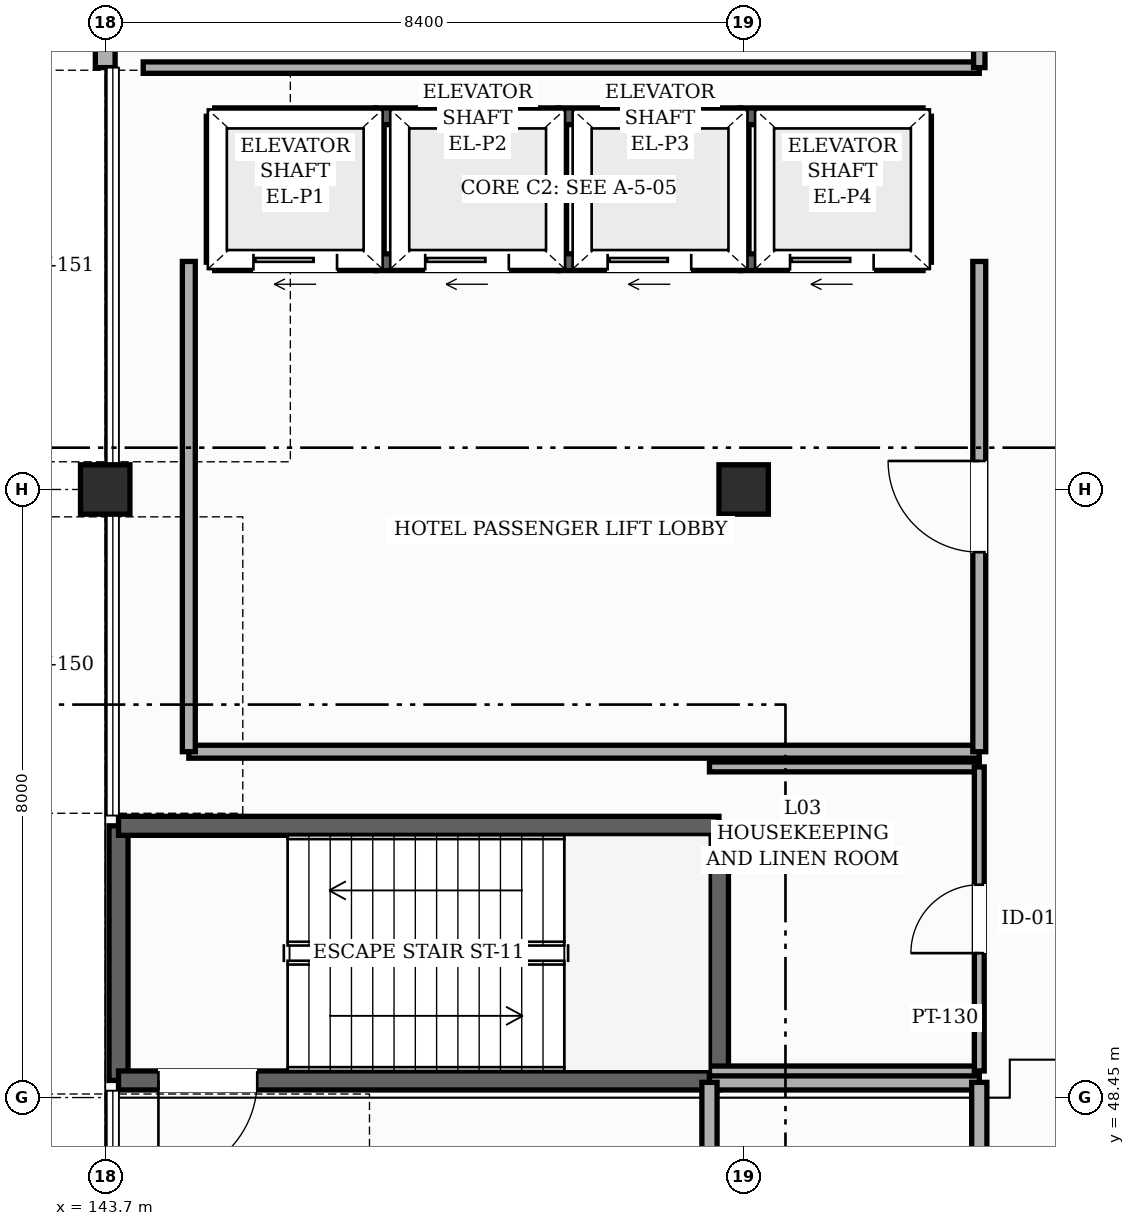
"""IFC4 building model, lengths in metres.
Left out: names, types, materials, properties, quantities, classifications, styles, units other than length and angle.
Written with IfcOpenShell. Run it as: python <this file> out.ifc"""

import sys

from ifc_helpers import new_model, si_unit, direction, frame, frame_2d, origin, origin_2d, place, context, subcontext, project, spatial, rectangle, hollow_rectangle, extrude, element, fill, save


model = new_model("IFC4")
c1 = context("Model", 3, precision=1e-05, world=origin(), true_north=direction((0.0, 1.0)))
c2 = subcontext(c1, "Body", "Model", "MODEL_VIEW")
j1 = project(units=[si_unit("LENGTHUNIT", "METRE"), si_unit("PLANEANGLEUNIT", "RADIAN")], contexts=[c1])
p1 = place(None, origin())
s1 = spatial("IfcSite", under=j1, at=p1, CompositionType="ELEMENT")
p2 = place(p1, origin())
s2 = spatial("IfcBuilding", under=s1, at=p2, CompositionType="ELEMENT")
p3 = place(p2, frame((0.0, 0.0, 15.0)))
s3 = spatial("IfcBuildingStorey", under=s2, at=p3, CompositionType="ELEMENT", Elevation=15.0)
for number, where, z_axis, x_axis in (
    (1, (143.7, 56.45, 0.0), (0.0, 0.0, 1.0), (1.0, 0.0, 0.0)),
    (2, (152.1, 56.45, 0.0), (0.0, 0.0, 1.0), (1.0, 0.0, 0.0)),
):
    element("IfcColumn", number, at=place(p3, frame(where, z_axis=z_axis, x_axis=x_axis)), inside=s3, PredefinedType="COLUMN", context=c2, shape_type="SweptSolid", body=[
        extrude(hollow_rectangle(XDim=0.65, YDim=0.65, WallThickness=0.025, InnerFilletRadius=0.025, OuterFilletRadius=0.05, at=origin_2d()), origin(), (0.0, 0.0, 1.0), 4.8),
    ])
p4 = place(p3, frame((143.7, 62.0, 0.0), z_axis=(0.0, 0.0, 1.0), x_axis=(0.0, 1.0, 0.0)))
e3 = element("IfcWall", 3, at=p4, inside=s3, PredefinedType="SOLIDWALL", context=c2, shape_type="SweptSolid", body=[
    extrude(rectangle(XDim=2.125, YDim=0.26, at=frame_2d((1.062, 0.0))), origin(), (0.0, 0.0, 1.0), 3.985),
])
p5 = place(p4, frame((0.49, 0.0, 0.85)))
e4 = element("IfcOpeningElement", 4, at=p5, cuts=e3, PredefinedType="OPENING", context=c2, shape_type="SweptSolid", body=[
    extrude(rectangle(XDim=1.15, YDim=1.65, at=frame_2d((0.575, 0.825))), frame((0.0, 0.14, 0.0), z_axis=(0.0, -1.0, 0.0), x_axis=(1.0, 0.0, 0.0)), (0.0, 0.0, 1.0), 0.28),
])
for number, where, z_axis, x_axis in (
    (5, (143.875, 48.675, 0.0), (0.0, 0.0, 1.0), (0.0, 1.0, 0.0)),
    (6, (151.775, 52.025, 0.0), (0.0, 0.0, 1.0), (0.0, -1.0, 0.0)),
):
    element("IfcWall", number, at=place(p3, frame(where, z_axis=z_axis, x_axis=x_axis)), inside=s3, PredefinedType="SHEAR", context=c2, shape_type="SweptSolid", body=[
        extrude(rectangle(XDim=3.35, YDim=0.25, at=frame_2d((1.675, 0.0))), origin(), (0.0, 0.0, 1.0), 4.56),
    ])
p6 = place(p3, frame((151.775, 48.675, 0.0), z_axis=(0.0, 0.0, 1.0), x_axis=(-1.0, 0.0, 0.0)))
e7 = element("IfcWall", 7, at=p6, inside=s3, PredefinedType="SHEAR", context=c2, shape_type="SweptSolid", body=[
    extrude(rectangle(XDim=7.9, YDim=0.25, at=frame_2d((3.95, 0.0))), origin(), (0.0, 0.0, 1.0), 4.56),
])
p7 = place(p6, frame((6.075, 0.0, 0.0)))
e8 = element("IfcOpeningElement", 8, at=p7, cuts=e7, PredefinedType="OPENING", context=c2, shape_type="SweptSolid", body=[
    extrude(rectangle(XDim=1.3, YDim=2.2, at=frame_2d((0.65, 1.1))), frame((0.0, 0.135, 0.0), z_axis=(0.0, -1.0, 0.0), x_axis=(1.0, 0.0, 0.0)), (0.0, 0.0, 1.0), 0.27),
])
p8 = place(p3, frame((143.875, 52.025, 0.0), z_axis=(0.0, 0.0, 1.0), x_axis=(1.0, 0.0, 0.0)))
e9 = element("IfcWall", 9, at=p8, inside=s3, PredefinedType="SHEAR", context=c2, shape_type="SweptSolid", body=[
    extrude(rectangle(XDim=7.9, YDim=0.25, at=frame_2d((3.95, 0.0))), origin(), (0.0, 0.0, 1.0), 4.56),
])
p9 = place(p3, frame((145.14, 61.36, 0.0), z_axis=(0.0, 0.0, 1.0), x_axis=(1.0, 0.0, 0.0)))
e10 = element("IfcWall", 10, at=p9, inside=s3, PredefinedType="SHEAR", context=c2, shape_type="SweptSolid", body=[
    extrude(rectangle(XDim=2.12, YDim=0.22, at=frame_2d((1.06, 0.0))), origin(), (0.0, 0.0, 1.0), 4.56),
])
p10 = place(p3, frame((145.14, 59.44, 0.0), z_axis=(0.0, 0.0, 1.0), x_axis=(1.0, 0.0, 0.0)))
e11 = element("IfcWall", 11, at=p10, inside=s3, PredefinedType="SHEAR", context=c2, shape_type="SweptSolid", body=[
    extrude(rectangle(XDim=2.12, YDim=0.22, at=frame_2d((1.06, 0.0))), origin(), (0.0, 0.0, 1.0), 4.56),
])
p11 = place(p10, frame((0.51, 0.0, 0.0)))
e12 = element("IfcOpeningElement", 12, at=p11, cuts=e11, PredefinedType="OPENING", context=c2, shape_type="SweptSolid", body=[
    extrude(rectangle(XDim=1.1, YDim=2.2, at=frame_2d((0.55, 1.1))), frame((0.0, 0.12, 0.0), z_axis=(0.0, -1.0, 0.0), x_axis=(1.0, 0.0, 0.0)), (0.0, 0.0, 1.0), 0.24),
])
for number, where, z_axis, x_axis in (
    (13, (147.26, 59.44, 0.0), (0.0, 0.0, 1.0), (0.0, 1.0, 0.0)),
    (14, (145.14, 59.44, 0.0), (0.0, 0.0, 1.0), (0.0, 1.0, 0.0)),
):
    element("IfcWall", number, at=place(p3, frame(where, z_axis=z_axis, x_axis=x_axis)), inside=s3, PredefinedType="SHEAR", context=c2, shape_type="SweptSolid", body=[
        extrude(rectangle(XDim=1.92, YDim=0.22, at=frame_2d((0.96, 0.0))), origin(), (0.0, 0.0, 1.0), 4.56),
    ])
p12 = place(p3, frame((147.26, 61.36, 0.0), z_axis=(0.0, 0.0, 1.0), x_axis=(1.0, 0.0, 0.0)))
e15 = element("IfcWall", 15, at=p12, inside=s3, PredefinedType="SHEAR", context=c2, shape_type="SweptSolid", body=[
    extrude(rectangle(XDim=2.4, YDim=0.22, at=frame_2d((1.2, 0.0))), origin(), (0.0, 0.0, 1.0), 4.56),
])
p13 = place(p3, frame((147.26, 59.44, 0.0), z_axis=(0.0, 0.0, 1.0), x_axis=(1.0, 0.0, 0.0)))
e16 = element("IfcWall", 16, at=p13, inside=s3, PredefinedType="SHEAR", context=c2, shape_type="SweptSolid", body=[
    extrude(rectangle(XDim=2.4, YDim=0.22, at=frame_2d((1.2, 0.0))), origin(), (0.0, 0.0, 1.0), 4.56),
])
p14 = place(p13, frame((0.65, 0.0, 0.0)))
e17 = element("IfcOpeningElement", 17, at=p14, cuts=e16, PredefinedType="OPENING", context=c2, shape_type="SweptSolid", body=[
    extrude(rectangle(XDim=1.1, YDim=2.2, at=frame_2d((0.55, 1.1))), frame((0.0, 0.12, 0.0), z_axis=(0.0, -1.0, 0.0), x_axis=(1.0, 0.0, 0.0)), (0.0, 0.0, 1.0), 0.24),
])
p15 = place(p3, frame((149.66, 59.44, 0.0), z_axis=(0.0, 0.0, 1.0), x_axis=(0.0, 1.0, 0.0)))
e18 = element("IfcWall", 18, at=p15, inside=s3, PredefinedType="SHEAR", context=c2, shape_type="SweptSolid", body=[
    extrude(rectangle(XDim=1.92, YDim=0.22, at=frame_2d((0.96, 0.0))), origin(), (0.0, 0.0, 1.0), 4.56),
])
p16 = place(p3, frame((149.66, 61.36, 0.0), z_axis=(0.0, 0.0, 1.0), x_axis=(1.0, 0.0, 0.0)))
e19 = element("IfcWall", 19, at=p16, inside=s3, PredefinedType="SHEAR", context=c2, shape_type="SweptSolid", body=[
    extrude(rectangle(XDim=2.4, YDim=0.22, at=frame_2d((1.2, 0.0))), origin(), (0.0, 0.0, 1.0), 4.56),
])
p17 = place(p3, frame((149.66, 59.44, 0.0), z_axis=(0.0, 0.0, 1.0), x_axis=(1.0, 0.0, 0.0)))
e20 = element("IfcWall", 20, at=p17, inside=s3, PredefinedType="SHEAR", context=c2, shape_type="SweptSolid", body=[
    extrude(rectangle(XDim=2.4, YDim=0.22, at=frame_2d((1.2, 0.0))), origin(), (0.0, 0.0, 1.0), 4.56),
])
p18 = place(p17, frame((0.65, 0.0, 0.0)))
e21 = element("IfcOpeningElement", 21, at=p18, cuts=e20, PredefinedType="OPENING", context=c2, shape_type="SweptSolid", body=[
    extrude(rectangle(XDim=1.1, YDim=2.2, at=frame_2d((0.55, 1.1))), frame((0.0, 0.12, 0.0), z_axis=(0.0, -1.0, 0.0), x_axis=(1.0, 0.0, 0.0)), (0.0, 0.0, 1.0), 0.24),
])
p19 = place(p3, frame((152.06, 59.44, 0.0), z_axis=(0.0, 0.0, 1.0), x_axis=(0.0, 1.0, 0.0)))
e22 = element("IfcWall", 22, at=p19, inside=s3, PredefinedType="SHEAR", context=c2, shape_type="SweptSolid", body=[
    extrude(rectangle(XDim=1.92, YDim=0.22, at=frame_2d((0.96, 0.0))), origin(), (0.0, 0.0, 1.0), 4.56),
])
p20 = place(p3, frame((152.06, 61.36, 0.0), z_axis=(0.0, 0.0, 1.0), x_axis=(1.0, 0.0, 0.0)))
e23 = element("IfcWall", 23, at=p20, inside=s3, PredefinedType="SHEAR", context=c2, shape_type="SweptSolid", body=[
    extrude(rectangle(XDim=2.4, YDim=0.22, at=frame_2d((1.2, 0.0))), origin(), (0.0, 0.0, 1.0), 4.56),
])
p21 = place(p3, frame((152.06, 59.44, 0.0), z_axis=(0.0, 0.0, 1.0), x_axis=(1.0, 0.0, 0.0)))
e24 = element("IfcWall", 24, at=p21, inside=s3, PredefinedType="SHEAR", context=c2, shape_type="SweptSolid", body=[
    extrude(rectangle(XDim=2.4, YDim=0.22, at=frame_2d((1.2, 0.0))), origin(), (0.0, 0.0, 1.0), 4.56),
])
p22 = place(p21, frame((0.65, 0.0, 0.0)))
e25 = element("IfcOpeningElement", 25, at=p22, cuts=e24, PredefinedType="OPENING", context=c2, shape_type="SweptSolid", body=[
    extrude(rectangle(XDim=1.1, YDim=2.2, at=frame_2d((0.55, 1.1))), frame((0.0, 0.12, 0.0), z_axis=(0.0, -1.0, 0.0), x_axis=(1.0, 0.0, 0.0)), (0.0, 0.0, 1.0), 0.24),
])
p23 = place(p3, frame((154.46, 59.44, 0.0), z_axis=(0.0, 0.0, 1.0), x_axis=(0.0, 1.0, 0.0)))
e26 = element("IfcWall", 26, at=p23, inside=s3, PredefinedType="SHEAR", context=c2, shape_type="SweptSolid", body=[
    extrude(rectangle(XDim=1.92, YDim=0.22, at=frame_2d((0.96, 0.0))), origin(), (0.0, 0.0, 1.0), 4.56),
])
p24 = place(p3, frame((151.65, 48.65, 0.0), z_axis=(0.0, 0.0, 1.0), x_axis=(1.0, 0.0, 0.0)))
e27 = element("IfcWall", 27, at=p24, inside=s3, PredefinedType="SOLIDWALL", context=c2, shape_type="SweptSolid", body=[
    extrude(rectangle(XDim=3.55, YDim=0.2, at=frame_2d((1.775, 0.0))), origin(), (0.0, 0.0, 1.0), 4.545),
])
for number, where, z_axis, x_axis in (
    (28, (151.65, 48.8, 0.0), (0.0, 0.0, 1.0), (1.0, 0.0, 0.0)),
    (29, (151.65, 52.8, 0.0), (0.0, 0.0, 1.0), (1.0, 0.0, 0.0)),
):
    element("IfcWall", number, at=place(p3, frame(where, z_axis=z_axis, x_axis=x_axis)), inside=s3, PredefinedType="PARTITIONING", context=c2, shape_type="SweptSolid", body=[
        extrude(rectangle(XDim=3.55, YDim=0.13, at=frame_2d((1.775, 0.0))), origin(), (0.0, 0.0, 1.0), 4.545),
    ])
p25 = place(p3, frame((144.8, 53.0, 0.0), z_axis=(0.0, 0.0, 1.0), x_axis=(1.0, 0.0, 0.0)))
e30 = element("IfcWall", 30, at=p25, inside=s3, PredefinedType="PARTITIONING", context=c2, shape_type="SweptSolid", body=[
    extrude(rectangle(XDim=10.4, YDim=0.17, at=frame_2d((5.2, 0.0))), origin(), (0.0, 0.0, 1.0), 4.545),
])
p26 = place(p3, frame((144.2, 62.0, 0.0), z_axis=(0.0, 0.0, 1.0), x_axis=(1.0, 0.0, 0.0)))
e31 = element("IfcWall", 31, at=p26, inside=s3, PredefinedType="PARTITIONING", context=c2, shape_type="SweptSolid", body=[
    extrude(rectangle(XDim=11.0, YDim=0.15, at=frame_2d((5.5, 0.0))), origin(), (0.0, 0.0, 1.0), 4.545),
])
p27 = place(p3, frame((144.8, 53.0, 0.0), z_axis=(0.0, 0.0, 1.0), x_axis=(0.0, 1.0, 0.0)))
e32 = element("IfcWall", 32, at=p27, inside=s3, PredefinedType="PARTITIONING", context=c2, shape_type="SweptSolid", body=[
    extrude(rectangle(XDim=6.45, YDim=0.17, at=frame_2d((3.225, 0.0))), origin(), (0.0, 0.0, 1.0), 4.545),
])
p28 = place(p3, frame((151.65, 44.1, 0.0), z_axis=(0.0, 0.0, 1.0), x_axis=(0.0, 1.0, 0.0)))
e33 = element("IfcWall", 33, at=p28, inside=s3, PredefinedType="SOLIDWALL", context=c2, shape_type="SweptSolid", body=[
    extrude(rectangle(XDim=4.55, YDim=0.2, at=frame_2d((2.275, 0.0))), origin(), (0.0, 0.0, 1.0), 4.545),
])
p29 = place(p28, frame((1.625, 0.0, 0.0)))
e34 = element("IfcOpeningElement", 34, at=p29, cuts=e33, PredefinedType="OPENING", context=c2, shape_type="SweptSolid", body=[
    extrude(rectangle(XDim=1.3, YDim=2.2, at=frame_2d((0.65, 1.1))), frame((0.0, 0.11, 0.0), z_axis=(0.0, -1.0, 0.0), x_axis=(1.0, 0.0, 0.0)), (0.0, 0.0, 1.0), 0.22),
])
p30 = place(p3, frame((155.2, 44.1, 0.0), z_axis=(0.0, 0.0, 1.0), x_axis=(0.0, 1.0, 0.0)))
e35 = element("IfcWall", 35, at=p30, inside=s3, PredefinedType="SOLIDWALL", context=c2, shape_type="SweptSolid", body=[
    extrude(rectangle(XDim=4.55, YDim=0.2, at=frame_2d((2.275, 0.0))), origin(), (0.0, 0.0, 1.0), 4.545),
])
p31 = place(p30, frame((1.625, 0.0, 0.0)))
e36 = element("IfcOpeningElement", 36, at=p31, cuts=e35, PredefinedType="OPENING", context=c2, shape_type="SweptSolid", body=[
    extrude(rectangle(XDim=1.3, YDim=2.2, at=frame_2d((0.65, 1.1))), frame((0.0, 0.11, 0.0), z_axis=(0.0, -1.0, 0.0), x_axis=(1.0, 0.0, 0.0)), (0.0, 0.0, 1.0), 0.22),
])
p32 = place(p3, frame((155.2, 48.8, 0.0), z_axis=(0.0, 0.0, 1.0), x_axis=(0.0, 1.0, 0.0)))
e37 = element("IfcWall", 37, at=p32, inside=s3, PredefinedType="PARTITIONING", context=c2, shape_type="SweptSolid", body=[
    extrude(rectangle(XDim=4.0, YDim=0.13, at=frame_2d((2.0, 0.0))), origin(), (0.0, 0.0, 1.0), 4.545),
])
p33 = place(p32, frame((1.55, 0.0, 0.0)))
e38 = element("IfcOpeningElement", 38, at=p33, cuts=e37, PredefinedType="OPENING", context=c2, shape_type="SweptSolid", body=[
    extrude(rectangle(XDim=0.9, YDim=2.15, at=frame_2d((0.45, 1.075))), frame((0.0, 0.075, 0.0), z_axis=(0.0, -1.0, 0.0), x_axis=(1.0, 0.0, 0.0)), (0.0, 0.0, 1.0), 0.15),
])
p34 = place(p3, frame((155.2, 53.0, 0.0), z_axis=(0.0, 0.0, 1.0), x_axis=(0.0, 1.0, 0.0)))
e39 = element("IfcWall", 39, at=p34, inside=s3, PredefinedType="PARTITIONING", context=c2, shape_type="SweptSolid", body=[
    extrude(rectangle(XDim=6.45, YDim=0.17, at=frame_2d((3.225, 0.0))), origin(), (0.0, 0.0, 1.0), 4.545),
])
p35 = place(p34, frame((2.625, 0.0, 0.0)))
e40 = element("IfcOpeningElement", 40, at=p35, cuts=e39, PredefinedType="OPENING", context=c2, shape_type="SweptSolid", body=[
    extrude(rectangle(XDim=1.2, YDim=2.2, at=frame_2d((0.6, 1.1))), frame((0.0, 0.095, 0.0), z_axis=(0.0, -1.0, 0.0), x_axis=(1.0, 0.0, 0.0)), (0.0, 0.0, 1.0), 0.19),
])
p36 = place(p3, frame((155.2, 62.0, 0.0), z_axis=(0.0, 0.0, 1.0), x_axis=(0.0, 1.0, 0.0)))
e41 = element("IfcWall", 41, at=p36, inside=s3, PredefinedType="PARTITIONING", context=c2, shape_type="SweptSolid", body=[
    extrude(rectangle(XDim=50.8, YDim=0.15, at=frame_2d((25.4, 0.0))), origin(), (0.0, 0.0, 1.0), 4.545),
])
p37 = place(p36, frame((0.53, 0.0, 0.0)))
e42 = element("IfcOpeningElement", 42, at=p37, cuts=e41, PredefinedType="OPENING", context=c2, shape_type="SweptSolid", body=[
    extrude(rectangle(XDim=1.1, YDim=2.2, at=frame_2d((0.55, 1.1))), frame((0.0, 0.085, 0.0), z_axis=(0.0, -1.0, 0.0), x_axis=(1.0, 0.0, 0.0)), (0.0, 0.0, 1.0), 0.17),
])
p38 = place(p36, frame((4.51, 0.0, 0.0)))
e43 = element("IfcOpeningElement", 43, at=p38, cuts=e41, PredefinedType="OPENING", context=c2, shape_type="SweptSolid", body=[
    extrude(rectangle(XDim=0.95, YDim=2.15, at=frame_2d((0.475, 1.075))), frame((0.0, 0.085, 0.0), z_axis=(0.0, -1.0, 0.0), x_axis=(1.0, 0.0, 0.0)), (0.0, 0.0, 1.0), 0.17),
])
p39 = place(p36, frame((8.42, 0.0, 0.0)))
e44 = element("IfcOpeningElement", 44, at=p39, cuts=e41, PredefinedType="OPENING", context=c2, shape_type="SweptSolid", body=[
    extrude(rectangle(XDim=0.95, YDim=2.15, at=frame_2d((0.475, 1.075))), frame((0.0, 0.085, 0.0), z_axis=(0.0, -1.0, 0.0), x_axis=(1.0, 0.0, 0.0)), (0.0, 0.0, 1.0), 0.17),
])
p40 = place(p36, frame((12.33, 0.0, 0.0)))
e45 = element("IfcOpeningElement", 45, at=p40, cuts=e41, PredefinedType="OPENING", context=c2, shape_type="SweptSolid", body=[
    extrude(rectangle(XDim=0.95, YDim=2.15, at=frame_2d((0.475, 1.075))), frame((0.0, 0.085, 0.0), z_axis=(0.0, -1.0, 0.0), x_axis=(1.0, 0.0, 0.0)), (0.0, 0.0, 1.0), 0.17),
])
p41 = place(p36, frame((16.235, 0.0, 0.0)))
e46 = element("IfcOpeningElement", 46, at=p41, cuts=e41, PredefinedType="OPENING", context=c2, shape_type="SweptSolid", body=[
    extrude(rectangle(XDim=0.95, YDim=2.15, at=frame_2d((0.475, 1.075))), frame((0.0, 0.085, 0.0), z_axis=(0.0, -1.0, 0.0), x_axis=(1.0, 0.0, 0.0)), (0.0, 0.0, 1.0), 0.17),
])
p42 = place(p36, frame((20.145, 0.0, 0.0)))
e47 = element("IfcOpeningElement", 47, at=p42, cuts=e41, PredefinedType="OPENING", context=c2, shape_type="SweptSolid", body=[
    extrude(rectangle(XDim=0.95, YDim=2.15, at=frame_2d((0.475, 1.075))), frame((0.0, 0.085, 0.0), z_axis=(0.0, -1.0, 0.0), x_axis=(1.0, 0.0, 0.0)), (0.0, 0.0, 1.0), 0.17),
])
p43 = place(p36, frame((24.05, 0.0, 0.0)))
e48 = element("IfcOpeningElement", 48, at=p43, cuts=e41, PredefinedType="OPENING", context=c2, shape_type="SweptSolid", body=[
    extrude(rectangle(XDim=0.95, YDim=2.15, at=frame_2d((0.475, 1.075))), frame((0.0, 0.085, 0.0), z_axis=(0.0, -1.0, 0.0), x_axis=(1.0, 0.0, 0.0)), (0.0, 0.0, 1.0), 0.17),
])
p44 = place(p36, frame((27.96, 0.0, 0.0)))
e49 = element("IfcOpeningElement", 49, at=p44, cuts=e41, PredefinedType="OPENING", context=c2, shape_type="SweptSolid", body=[
    extrude(rectangle(XDim=0.95, YDim=2.15, at=frame_2d((0.475, 1.075))), frame((0.0, 0.085, 0.0), z_axis=(0.0, -1.0, 0.0), x_axis=(1.0, 0.0, 0.0)), (0.0, 0.0, 1.0), 0.17),
])
p45 = place(p36, frame((31.865, 0.0, 0.0)))
e50 = element("IfcOpeningElement", 50, at=p45, cuts=e41, PredefinedType="OPENING", context=c2, shape_type="SweptSolid", body=[
    extrude(rectangle(XDim=0.95, YDim=2.15, at=frame_2d((0.475, 1.075))), frame((0.0, 0.085, 0.0), z_axis=(0.0, -1.0, 0.0), x_axis=(1.0, 0.0, 0.0)), (0.0, 0.0, 1.0), 0.17),
])
p46 = place(p36, frame((35.77, 0.0, 0.0)))
e51 = element("IfcOpeningElement", 51, at=p46, cuts=e41, PredefinedType="OPENING", context=c2, shape_type="SweptSolid", body=[
    extrude(rectangle(XDim=0.95, YDim=2.15, at=frame_2d((0.475, 1.075))), frame((0.0, 0.085, 0.0), z_axis=(0.0, -1.0, 0.0), x_axis=(1.0, 0.0, 0.0)), (0.0, 0.0, 1.0), 0.17),
])
p47 = place(p36, frame((39.68, 0.0, 0.0)))
e52 = element("IfcOpeningElement", 52, at=p47, cuts=e41, PredefinedType="OPENING", context=c2, shape_type="SweptSolid", body=[
    extrude(rectangle(XDim=0.95, YDim=2.15, at=frame_2d((0.475, 1.075))), frame((0.0, 0.085, 0.0), z_axis=(0.0, -1.0, 0.0), x_axis=(1.0, 0.0, 0.0)), (0.0, 0.0, 1.0), 0.17),
])
p48 = place(p36, frame((43.59, 0.0, 0.0)))
e53 = element("IfcOpeningElement", 53, at=p48, cuts=e41, PredefinedType="OPENING", context=c2, shape_type="SweptSolid", body=[
    extrude(rectangle(XDim=0.95, YDim=2.15, at=frame_2d((0.475, 1.075))), frame((0.0, 0.085, 0.0), z_axis=(0.0, -1.0, 0.0), x_axis=(1.0, 0.0, 0.0)), (0.0, 0.0, 1.0), 0.17),
])
p49 = place(p36, frame((47.495, 0.0, 0.0)))
e54 = element("IfcOpeningElement", 54, at=p49, cuts=e41, PredefinedType="OPENING", context=c2, shape_type="SweptSolid", body=[
    extrude(rectangle(XDim=0.95, YDim=2.15, at=frame_2d((0.475, 1.075))), frame((0.0, 0.085, 0.0), z_axis=(0.0, -1.0, 0.0), x_axis=(1.0, 0.0, 0.0)), (0.0, 0.0, 1.0), 0.17),
])
p50 = place(p7, origin())
e55 = element("IfcDoor", 55, at=p50, inside=s3, OperationType="SINGLE_SWING_RIGHT", PredefinedType="DOOR", context=c2, shape_type="SweptSolid", body=[
    extrude(rectangle(XDim=1.3, YDim=2.2, at=frame_2d((0.65, 1.1))), frame((0.0, 0.025, 0.0), z_axis=(0.0, -1.0, 0.0), x_axis=(1.0, 0.0, 0.0)), (0.0, 0.0, 1.0), 0.05),
])
fill(e8, e55)
p51 = place(p11, origin())
e56 = element("IfcDoor", 56, at=p51, inside=s3, OperationType="SLIDING_TO_LEFT", PredefinedType="DOOR", context=c2, shape_type="SweptSolid", body=[
    extrude(rectangle(XDim=1.1, YDim=2.2, at=frame_2d((0.55, 1.1))), frame((0.0, 0.025, 0.0), z_axis=(0.0, -1.0, 0.0), x_axis=(1.0, 0.0, 0.0)), (0.0, 0.0, 1.0), 0.05),
])
fill(e12, e56)
p52 = place(p14, origin())
e57 = element("IfcDoor", 57, at=p52, inside=s3, OperationType="SLIDING_TO_LEFT", PredefinedType="DOOR", context=c2, shape_type="SweptSolid", body=[
    extrude(rectangle(XDim=1.1, YDim=2.2, at=frame_2d((0.55, 1.1))), frame((0.0, 0.025, 0.0), z_axis=(0.0, -1.0, 0.0), x_axis=(1.0, 0.0, 0.0)), (0.0, 0.0, 1.0), 0.05),
])
fill(e17, e57)
p53 = place(p18, origin())
e58 = element("IfcDoor", 58, at=p53, inside=s3, OperationType="SLIDING_TO_LEFT", PredefinedType="DOOR", context=c2, shape_type="SweptSolid", body=[
    extrude(rectangle(XDim=1.1, YDim=2.2, at=frame_2d((0.55, 1.1))), frame((0.0, 0.025, 0.0), z_axis=(0.0, -1.0, 0.0), x_axis=(1.0, 0.0, 0.0)), (0.0, 0.0, 1.0), 0.05),
])
fill(e21, e58)
p54 = place(p22, origin())
e59 = element("IfcDoor", 59, at=p54, inside=s3, OperationType="SLIDING_TO_LEFT", PredefinedType="DOOR", context=c2, shape_type="SweptSolid", body=[
    extrude(rectangle(XDim=1.1, YDim=2.2, at=frame_2d((0.55, 1.1))), frame((0.0, 0.025, 0.0), z_axis=(0.0, -1.0, 0.0), x_axis=(1.0, 0.0, 0.0)), (0.0, 0.0, 1.0), 0.05),
])
fill(e25, e59)
p55 = place(p35, origin())
e60 = element("IfcDoor", 60, at=p55, inside=s3, OperationType="SINGLE_SWING_RIGHT", PredefinedType="DOOR", context=c2, shape_type="SweptSolid", body=[
    extrude(rectangle(XDim=1.2, YDim=2.2, at=frame_2d((0.6, 1.1))), frame((0.0, 0.025, 0.0), z_axis=(0.0, -1.0, 0.0), x_axis=(1.0, 0.0, 0.0)), (0.0, 0.0, 1.0), 0.05),
])
fill(e40, e60)
p56 = place(p33, origin())
e61 = element("IfcDoor", 61, at=p56, inside=s3, OperationType="SINGLE_SWING_LEFT", PredefinedType="DOOR", context=c2, shape_type="SweptSolid", body=[
    extrude(rectangle(XDim=0.9, YDim=2.15, at=frame_2d((0.45, 1.075))), frame((0.0, 0.025, 0.0), z_axis=(0.0, -1.0, 0.0), x_axis=(1.0, 0.0, 0.0)), (0.0, 0.0, 1.0), 0.05),
])
fill(e38, e61)
save(model, sys.argv[1])
